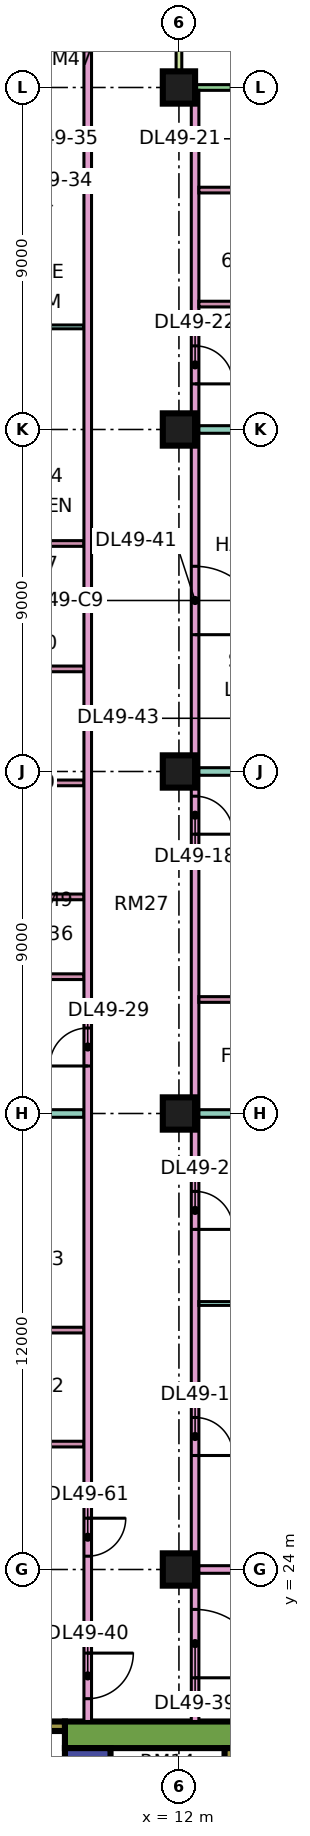
"""IFC4 building model, lengths in metres.
Left out: names, types, materials, properties, quantities, classifications, styles, units other than length and angle.
Written with IfcOpenShell. Run it as: python <this file> out.ifc"""

import sys

from ifc_helpers import new_model, si_unit, direction, frame, frame_2d, origin, origin_2d, place, context, subcontext, project, spatial, rectangle, extrude, element, fill, save


model = new_model("IFC4")
c1 = context("Model", 3, precision=1e-05, world=origin(), true_north=direction((0.0, 1.0)))
c2 = subcontext(c1, "Body", "Model", "MODEL_VIEW")
j1 = project(units=[si_unit("LENGTHUNIT", "METRE"), si_unit("PLANEANGLEUNIT", "RADIAN")], contexts=[c1])
p1 = place(None, origin())
s1 = spatial("IfcSite", under=j1, at=p1, CompositionType="ELEMENT")
p2 = place(p1, origin())
s2 = spatial("IfcBuilding", under=s1, at=p2, CompositionType="ELEMENT")
p3 = place(p2, frame((0.0, 0.0, 211.65)))
s3 = spatial("IfcBuildingStorey", under=s2, at=p3, CompositionType="ELEMENT", Elevation=211.65)
for number, where, z_axis, x_axis in (
    (1, (12.0, 24.0, 0.0), (0.0, 0.0, 1.0), (1.0, 0.0, 0.0)),
    (2, (12.0, 36.0, 0.0), (0.0, 0.0, 1.0), (1.0, 0.0, 0.0)),
    (3, (12.0, 45.0, 0.0), (0.0, 0.0, 1.0), (1.0, 0.0, 0.0)),
    (4, (12.0, 54.0, 0.0), (0.0, 0.0, 1.0), (1.0, 0.0, 0.0)),
    (5, (12.0, 63.0, 0.0), (0.0, 0.0, 1.0), (1.0, 0.0, 0.0)),
):
    element("IfcColumn", number, at=place(p3, frame(where, z_axis=z_axis, x_axis=x_axis)), inside=s3, PredefinedType="COLUMN", context=c2, shape_type="SweptSolid", body=[
        extrude(rectangle(XDim=0.85, YDim=0.85, at=origin_2d()), origin(), (0.0, 0.0, 1.0), 3.75),
    ])
p4 = place(p3, frame((9.0, 19.65, 0.0), z_axis=(0.0, 0.0, 1.0), x_axis=(1.0, 0.0, 0.0)))
e6 = element("IfcWall", 6, at=p4, inside=s3, PredefinedType="SHEAR", context=c2, shape_type="SweptSolid", body=[
    extrude(rectangle(XDim=25.0, YDim=0.7, at=frame_2d((12.5, 0.0))), origin(), (0.0, 0.0, 1.0), 3.75),
])
p5 = place(p4, frame((19.1, 0.0, 0.0)))
e7 = element("IfcOpeningElement", 7, at=p5, cuts=e6, PredefinedType="OPENING", context=c2, shape_type="SweptSolid", body=[
    extrude(rectangle(XDim=1.8, YDim=2.4, at=frame_2d((0.9, 1.2))), frame((0.0, 0.36, 0.0), z_axis=(0.0, -1.0, 0.0), x_axis=(1.0, 0.0, 0.0)), (0.0, 0.0, 1.0), 0.72),
])
p6 = place(p3, frame((9.6, 7.7, 0.0), z_axis=(0.0, 0.0, 1.0), x_axis=(0.0, 1.0, 0.0)))
e8 = element("IfcWall", 8, at=p6, inside=s3, PredefinedType="SHEAR", context=c2, shape_type="SweptSolid", body=[
    extrude(rectangle(XDim=11.6, YDim=1.2, at=frame_2d((5.8, 0.0))), origin(), (0.0, 0.0, 1.0), 3.75),
])
p7 = place(p6, frame((4.175, 0.0, 0.0)))
e9 = element("IfcOpeningElement", 9, at=p7, cuts=e8, PredefinedType="OPENING", context=c2, shape_type="SweptSolid", body=[
    extrude(rectangle(XDim=1.1, YDim=2.2, at=frame_2d((0.55, 1.1))), frame((0.0, 0.61, 0.0), z_axis=(0.0, -1.0, 0.0), x_axis=(1.0, 0.0, 0.0)), (0.0, 0.0, 1.0), 1.22),
])
p8 = place(p6, frame((6.675, 0.0, 0.0)))
e10 = element("IfcOpeningElement", 10, at=p8, cuts=e8, PredefinedType="OPENING", context=c2, shape_type="SweptSolid", body=[
    extrude(rectangle(XDim=1.1, YDim=2.2, at=frame_2d((0.55, 1.1))), frame((0.0, 0.61, 0.0), z_axis=(0.0, -1.0, 0.0), x_axis=(1.0, 0.0, 0.0)), (0.0, 0.0, 1.0), 1.22),
])
p9 = place(p6, frame((9.55, 0.0, 0.0)))
e11 = element("IfcOpeningElement", 11, at=p9, cuts=e8, PredefinedType="OPENING", context=c2, shape_type="SweptSolid", body=[
    extrude(rectangle(XDim=1.1, YDim=2.2, at=frame_2d((0.55, 1.1))), frame((0.0, 0.61, 0.0), z_axis=(0.0, -1.0, 0.0), x_axis=(1.0, 0.0, 0.0)), (0.0, 0.0, 1.0), 1.22),
])
p10 = place(p6, frame((1.85, 0.0, 0.0)))
e12 = element("IfcOpeningElement", 12, at=p10, cuts=e8, PredefinedType="OPENING", context=c2, shape_type="SweptSolid", body=[
    extrude(rectangle(XDim=0.9, YDim=2.1, at=frame_2d((0.45, 1.05))), frame((0.0, 0.61, 0.0), z_axis=(0.0, -1.0, 0.0), x_axis=(1.0, 0.0, 0.0)), (0.0, 0.0, 1.0), 1.22),
])
p11 = place(p3, frame((13.325, 7.7, 0.0), z_axis=(0.0, 0.0, 1.0), x_axis=(0.0, 1.0, 0.0)))
e13 = element("IfcWall", 13, at=p11, inside=s3, PredefinedType="SHEAR", context=c2, shape_type="SweptSolid", body=[
    extrude(rectangle(XDim=11.6, YDim=0.25, at=frame_2d((5.8, 0.0))), origin(), (0.0, 0.0, 1.0), 3.75),
])
p12 = place(p3, frame((2.1, 19.875, 0.0), z_axis=(0.0, 0.0, 1.0), x_axis=(1.0, 0.0, 0.0)))
e14 = element("IfcWall", 14, at=p12, inside=s3, PredefinedType="SHEAR", context=c2, shape_type="SweptSolid", body=[
    extrude(rectangle(XDim=6.9, YDim=0.25, at=frame_2d((3.45, 0.0))), origin(), (0.0, 0.0, 1.0), 3.75),
])
p13 = place(p12, frame((1.175, 0.0, 0.0)))
e15 = element("IfcOpeningElement", 15, at=p13, cuts=e14, PredefinedType="OPENING", context=c2, shape_type="SweptSolid", body=[
    extrude(rectangle(XDim=1.1, YDim=2.2, at=frame_2d((0.55, 1.1))), frame((0.0, 0.135, 0.0), z_axis=(0.0, -1.0, 0.0), x_axis=(1.0, 0.0, 0.0)), (0.0, 0.0, 1.0), 0.27),
])
p14 = place(p12, frame((4.6, 0.0, 0.0)))
e16 = element("IfcOpeningElement", 16, at=p14, cuts=e14, PredefinedType="OPENING", context=c2, shape_type="SweptSolid", body=[
    extrude(rectangle(XDim=1.2, YDim=2.2, at=frame_2d((0.6, 1.1))), frame((0.0, 0.135, 0.0), z_axis=(0.0, -1.0, 0.0), x_axis=(1.0, 0.0, 0.0)), (0.0, 0.0, 1.0), 0.27),
])
p15 = place(p3, frame((22.425, 63.0, 0.0), z_axis=(0.0, 0.0, 1.0), x_axis=(-1.0, 0.0, 0.0)))
e17 = element("IfcWall", 17, at=p15, inside=s3, PredefinedType="SOLIDWALL", context=c2, shape_type="SweptSolid", body=[
    extrude(rectangle(XDim=10.35, YDim=0.15, at=frame_2d((5.175, 0.0))), origin(), (0.0, 0.0, 1.0), 3.35),
])
p16 = place(p15, frame((1.1, 0.0, 0.0)))
e18 = element("IfcOpeningElement", 18, at=p16, cuts=e17, PredefinedType="OPENING", context=c2, shape_type="SweptSolid", body=[
    extrude(rectangle(XDim=1.8, YDim=2.4, at=frame_2d((0.9, 1.2))), frame((0.0, 0.085, 0.0), z_axis=(0.0, -1.0, 0.0), x_axis=(1.0, 0.0, 0.0)), (0.0, 0.0, 1.0), 0.17),
])
p17 = place(p15, frame((6.05, 0.0, 0.45)))
e19 = element("IfcOpeningElement", 19, at=p17, cuts=e17, PredefinedType="OPENING", context=c2, shape_type="SweptSolid", body=[
    extrude(rectangle(XDim=3.0, YDim=2.4, at=frame_2d((1.5, 1.2))), frame((0.0, 0.085, 0.0), z_axis=(0.0, -1.0, 0.0), x_axis=(1.0, 0.0, 0.0)), (0.0, 0.0, 1.0), 0.17),
])
p18 = place(p3, frame((12.0, 64.5, 0.0), z_axis=(0.0, 0.0, 1.0), x_axis=(0.0, -1.0, 0.0)))
e20 = element("IfcWall", 20, at=p18, inside=s3, PredefinedType="SOLIDWALL", context=c2, shape_type="SweptSolid", body=[
    extrude(rectangle(XDim=1.5, YDim=0.15, at=frame_2d((0.75, 0.0))), origin(), (0.0, 0.0, 1.0), 3.35),
])
p19 = place(p3, frame((0.074, 22.4, 0.0), z_axis=(0.0, 0.0, 1.0), x_axis=(1.0, 0.0, 0.0)))
e21 = element("IfcWall", 21, at=p19, inside=s3, PredefinedType="PARTITIONING", context=c2, shape_type="SweptSolid", body=[
    extrude(rectangle(XDim=9.426, YDim=0.2, at=frame_2d((4.713, 0.0))), origin(), (0.0, 0.0, 1.0), 3.35),
])
p20 = place(p3, frame((5.65, 36.0, 0.0), z_axis=(0.0, 0.0, 1.0), x_axis=(1.0, 0.0, 0.0)))
e22 = element("IfcWall", 22, at=p20, inside=s3, PredefinedType="PARTITIONING", context=c2, shape_type="SweptSolid", body=[
    extrude(rectangle(XDim=3.85, YDim=0.2, at=frame_2d((1.925, 0.0))), origin(), (0.0, 0.0, 1.0), 3.35),
])
p21 = place(p3, frame((6.675, 39.6, 0.0), z_axis=(0.0, 0.0, 1.0), x_axis=(1.0, 0.0, 0.0)))
e23 = element("IfcWall", 23, at=p21, inside=s3, PredefinedType="PARTITIONING", context=c2, shape_type="SweptSolid", body=[
    extrude(rectangle(XDim=2.825, YDim=0.15, at=frame_2d((1.413, 0.0))), origin(), (0.0, 0.0, 1.0), 3.35),
])
p22 = place(p21, frame((1.075, 0.0, 0.0)))
e24 = element("IfcOpeningElement", 24, at=p22, cuts=e23, PredefinedType="OPENING", context=c2, shape_type="SweptSolid", body=[
    extrude(rectangle(XDim=0.8, YDim=2.1, at=frame_2d((0.4, 1.05))), frame((0.0, 0.085, 0.0), z_axis=(0.0, -1.0, 0.0), x_axis=(1.0, 0.0, 0.0)), (0.0, 0.0, 1.0), 0.17),
])
for number, where, z_axis, x_axis in (
    (25, (6.675, 41.7, 0.0), (0.0, 0.0, 1.0), (1.0, 0.0, 0.0)),
    (26, (6.675, 44.7, 0.0), (0.0, 0.0, 1.0), (1.0, 0.0, 0.0)),
    (27, (6.675, 47.7, 0.0), (0.0, 0.0, 1.0), (1.0, 0.0, 0.0)),
    (28, (6.675, 51.0, 0.0), (0.0, 0.0, 1.0), (1.0, 0.0, 0.0)),
):
    element("IfcWall", number, at=place(p3, frame(where, z_axis=z_axis, x_axis=x_axis)), inside=s3, PredefinedType="PARTITIONING", context=c2, shape_type="SweptSolid", body=[
        extrude(rectangle(XDim=2.825, YDim=0.15, at=frame_2d((1.413, 0.0))), origin(), (0.0, 0.0, 1.0), 3.35),
    ])
for number, where, z_axis, x_axis in (
    (29, (6.675, 56.7, 0.0), (0.0, 0.0, 1.0), (1.0, 0.0, 0.0)),
    (30, (6.675, 60.3, 0.0), (0.0, 0.0, 1.0), (1.0, 0.0, 0.0)),
):
    element("IfcWall", number, at=place(p3, frame(where, z_axis=z_axis, x_axis=x_axis)), inside=s3, PredefinedType="PARTITIONING", context=c2, shape_type="SweptSolid", body=[
        extrude(rectangle(XDim=2.825, YDim=0.1, at=frame_2d((1.413, 0.0))), origin(), (0.0, 0.0, 1.0), 3.35),
    ])
for number, where, z_axis, x_axis in (
    (31, (6.975, 27.3, 0.0), (0.0, 0.0, 1.0), (1.0, 0.0, 0.0)),
    (32, (6.975, 30.3, 0.0), (0.0, 0.0, 1.0), (1.0, 0.0, 0.0)),
):
    element("IfcWall", number, at=place(p3, frame(where, z_axis=z_axis, x_axis=x_axis)), inside=s3, PredefinedType="PARTITIONING", context=c2, shape_type="SweptSolid", body=[
        extrude(rectangle(XDim=2.525, YDim=0.15, at=frame_2d((1.262, 0.0))), origin(), (0.0, 0.0, 1.0), 3.35),
    ])
p23 = place(p3, frame((9.6, 20.0, 0.0), z_axis=(0.0, 0.0, 1.0), x_axis=(0.0, 1.0, 0.0)))
e33 = element("IfcWall", 33, at=p23, inside=s3, PredefinedType="PARTITIONING", context=c2, shape_type="SweptSolid", body=[
    extrude(rectangle(XDim=44.35, YDim=0.2, at=frame_2d((22.175, 0.0))), origin(), (0.0, 0.0, 1.0), 3.35),
])
p24 = place(p23, frame((17.25, 0.0, 0.0)))
e34 = element("IfcOpeningElement", 34, at=p24, cuts=e33, PredefinedType="OPENING", context=c2, shape_type="SweptSolid", body=[
    extrude(rectangle(XDim=1.0, YDim=2.1, at=frame_2d((0.5, 1.05))), frame((0.0, 0.11, 0.0), z_axis=(0.0, -1.0, 0.0), x_axis=(1.0, 0.0, 0.0)), (0.0, 0.0, 1.0), 0.22),
])
p25 = place(p23, frame((0.6, 0.0, 0.0)))
e35 = element("IfcOpeningElement", 35, at=p25, cuts=e33, PredefinedType="OPENING", context=c2, shape_type="SweptSolid", body=[
    extrude(rectangle(XDim=1.2, YDim=2.1, at=frame_2d((0.6, 1.05))), frame((0.0, 0.11, 0.0), z_axis=(0.0, -1.0, 0.0), x_axis=(1.0, 0.0, 0.0)), (0.0, 0.0, 1.0), 0.22),
])
p26 = place(p23, frame((4.35, 0.0, 0.0)))
e36 = element("IfcOpeningElement", 36, at=p26, cuts=e33, PredefinedType="OPENING", context=c2, shape_type="SweptSolid", body=[
    extrude(rectangle(XDim=1.0, YDim=2.1, at=frame_2d((0.5, 1.05))), frame((0.0, 0.11, 0.0), z_axis=(0.0, -1.0, 0.0), x_axis=(1.0, 0.0, 0.0)), (0.0, 0.0, 1.0), 0.22),
])
p27 = place(p3, frame((12.425, 20.0, 0.0), z_axis=(0.0, 0.0, 1.0), x_axis=(0.0, 1.0, 0.0)))
e37 = element("IfcWall", 37, at=p27, inside=s3, PredefinedType="PARTITIONING", context=c2, shape_type="SweptSolid", body=[
    extrude(rectangle(XDim=42.926, YDim=0.2, at=frame_2d((21.463, 0.0))), origin(), (0.0, 0.0, 1.0), 3.35),
])
p28 = place(p27, frame((7.0, 0.0, 0.0)))
e38 = element("IfcOpeningElement", 38, at=p28, cuts=e37, PredefinedType="OPENING", context=c2, shape_type="SweptSolid", body=[
    extrude(rectangle(XDim=1.0, YDim=2.1, at=frame_2d((0.5, 1.05))), frame((0.0, 0.11, 0.0), z_axis=(0.0, -1.0, 0.0), x_axis=(1.0, 0.0, 0.0)), (0.0, 0.0, 1.0), 0.22),
])
p29 = place(p27, frame((12.95, 0.0, 0.0)))
e39 = element("IfcOpeningElement", 39, at=p29, cuts=e37, PredefinedType="OPENING", context=c2, shape_type="SweptSolid", body=[
    extrude(rectangle(XDim=1.0, YDim=2.1, at=frame_2d((0.5, 1.05))), frame((0.0, 0.11, 0.0), z_axis=(0.0, -1.0, 0.0), x_axis=(1.0, 0.0, 0.0)), (0.0, 0.0, 1.0), 0.22),
])
p30 = place(p27, frame((23.35, 0.0, 0.0)))
e40 = element("IfcOpeningElement", 40, at=p30, cuts=e37, PredefinedType="OPENING", context=c2, shape_type="SweptSolid", body=[
    extrude(rectangle(XDim=1.0, YDim=2.1, at=frame_2d((0.5, 1.05))), frame((0.0, 0.11, 0.0), z_axis=(0.0, -1.0, 0.0), x_axis=(1.0, 0.0, 0.0)), (0.0, 0.0, 1.0), 0.22),
])
p31 = place(p27, frame((35.2, 0.0, 0.0)))
e41 = element("IfcOpeningElement", 41, at=p31, cuts=e37, PredefinedType="OPENING", context=c2, shape_type="SweptSolid", body=[
    extrude(rectangle(XDim=1.0, YDim=2.1, at=frame_2d((0.5, 1.05))), frame((0.0, 0.11, 0.0), z_axis=(0.0, -1.0, 0.0), x_axis=(1.0, 0.0, 0.0)), (0.0, 0.0, 1.0), 0.22),
])
p32 = place(p27, frame((1.15, 0.0, 0.0)))
e42 = element("IfcOpeningElement", 42, at=p32, cuts=e37, PredefinedType="OPENING", context=c2, shape_type="SweptSolid", body=[
    extrude(rectangle(XDim=1.8, YDim=2.1, at=frame_2d((0.9, 1.05))), frame((0.0, 0.11, 0.0), z_axis=(0.0, -1.0, 0.0), x_axis=(1.0, 0.0, 0.0)), (0.0, 0.0, 1.0), 0.22),
])
p33 = place(p27, frame((28.6, 0.0, 0.0)))
e43 = element("IfcOpeningElement", 43, at=p33, cuts=e37, PredefinedType="OPENING", context=c2, shape_type="SweptSolid", body=[
    extrude(rectangle(XDim=1.8, YDim=2.1, at=frame_2d((0.9, 1.05))), frame((0.0, 0.11, 0.0), z_axis=(0.0, -1.0, 0.0), x_axis=(1.0, 0.0, 0.0)), (0.0, 0.0, 1.0), 0.22),
])
p34 = place(p3, frame((12.525, 24.0, 0.0), z_axis=(0.0, 0.0, 1.0), x_axis=(1.0, 0.0, 0.0)))
e44 = element("IfcWall", 44, at=p34, inside=s3, PredefinedType="PARTITIONING", context=c2, shape_type="SweptSolid", body=[
    extrude(rectangle(XDim=8.975, YDim=0.2, at=frame_2d((4.488, 0.0))), origin(), (0.0, 0.0, 1.0), 3.35),
])
p35 = place(p3, frame((12.525, 31.0, 0.0), z_axis=(0.0, 0.0, 1.0), x_axis=(1.0, 0.0, 0.0)))
e45 = element("IfcWall", 45, at=p35, inside=s3, PredefinedType="PARTITIONING", context=c2, shape_type="SweptSolid", body=[
    extrude(rectangle(XDim=8.975, YDim=0.1, at=frame_2d((4.488, 0.0))), origin(), (0.0, 0.0, 1.0), 3.35),
])
p36 = place(p3, frame((12.525, 36.0, 0.0), z_axis=(0.0, 0.0, 1.0), x_axis=(1.0, 0.0, 0.0)))
e46 = element("IfcWall", 46, at=p36, inside=s3, PredefinedType="PARTITIONING", context=c2, shape_type="SweptSolid", body=[
    extrude(rectangle(XDim=11.475, YDim=0.2, at=frame_2d((5.738, 0.0))), origin(), (0.0, 0.0, 1.0), 3.35),
])
for number, where, z_axis, x_axis in (
    (47, (12.525, 39.0, 0.0), (0.0, 0.0, 1.0), (1.0, 0.0, 0.0)),
    (48, (12.525, 42.6, 0.0), (0.0, 0.0, 1.0), (1.0, 0.0, 0.0)),
):
    element("IfcWall", number, at=place(p3, frame(where, z_axis=z_axis, x_axis=x_axis)), inside=s3, PredefinedType="PARTITIONING", context=c2, shape_type="SweptSolid", body=[
        extrude(rectangle(XDim=5.225, YDim=0.15, at=frame_2d((2.613, 0.0))), origin(), (0.0, 0.0, 1.0), 3.35),
    ])
p37 = place(p3, frame((12.525, 45.0, 0.0), z_axis=(0.0, 0.0, 1.0), x_axis=(1.0, 0.0, 0.0)))
e49 = element("IfcWall", 49, at=p37, inside=s3, PredefinedType="PARTITIONING", context=c2, shape_type="SweptSolid", body=[
    extrude(rectangle(XDim=11.401, YDim=0.2, at=frame_2d((5.701, 0.0))), origin(), (0.0, 0.0, 1.0), 3.35),
])
p38 = place(p3, frame((12.525, 54.0, 0.0), z_axis=(0.0, 0.0, 1.0), x_axis=(1.0, 0.0, 0.0)))
e50 = element("IfcWall", 50, at=p38, inside=s3, PredefinedType="PARTITIONING", context=c2, shape_type="SweptSolid", body=[
    extrude(rectangle(XDim=11.475, YDim=0.2, at=frame_2d((5.738, 0.0))), origin(), (0.0, 0.0, 1.0), 3.35),
])
for number, where, z_axis, x_axis in (
    (51, (12.525, 57.3, 0.0), (0.0, 0.0, 1.0), (1.0, 0.0, 0.0)),
    (52, (12.525, 60.3, 0.0), (0.0, 0.0, 1.0), (1.0, 0.0, 0.0)),
):
    element("IfcWall", number, at=place(p3, frame(where, z_axis=z_axis, x_axis=x_axis)), inside=s3, PredefinedType="PARTITIONING", context=c2, shape_type="SweptSolid", body=[
        extrude(rectangle(XDim=4.625, YDim=0.15, at=frame_2d((2.312, 0.0))), origin(), (0.0, 0.0, 1.0), 3.35),
    ])
p39 = place(p28, frame((1.0, 0.0, 0.0), z_axis=(0.0, 0.0, 1.0), x_axis=(-1.0, 0.0, 0.0)))
e53 = element("IfcDoor", 53, at=p39, inside=s3, OperationType="SINGLE_SWING_LEFT", PredefinedType="DOOR", context=c2, shape_type="SweptSolid", body=[
    extrude(rectangle(XDim=1.0, YDim=2.1, at=frame_2d((0.5, 1.05))), frame((0.0, 0.025, 0.0), z_axis=(0.0, -1.0, 0.0), x_axis=(1.0, 0.0, 0.0)), (0.0, 0.0, 1.0), 0.05),
])
fill(e38, e53)
p40 = place(p29, frame((1.0, 0.0, 0.0), z_axis=(0.0, 0.0, 1.0), x_axis=(-1.0, 0.0, 0.0)))
e54 = element("IfcDoor", 54, at=p40, inside=s3, OperationType="SINGLE_SWING_LEFT", PredefinedType="DOOR", context=c2, shape_type="SweptSolid", body=[
    extrude(rectangle(XDim=1.0, YDim=2.1, at=frame_2d((0.5, 1.05))), frame((0.0, 0.025, 0.0), z_axis=(0.0, -1.0, 0.0), x_axis=(1.0, 0.0, 0.0)), (0.0, 0.0, 1.0), 0.05),
])
fill(e39, e54)
p41 = place(p30, frame((1.0, 0.0, 0.0), z_axis=(0.0, 0.0, 1.0), x_axis=(-1.0, 0.0, 0.0)))
e55 = element("IfcDoor", 55, at=p41, inside=s3, OperationType="SINGLE_SWING_LEFT", PredefinedType="DOOR", context=c2, shape_type="SweptSolid", body=[
    extrude(rectangle(XDim=1.0, YDim=2.1, at=frame_2d((0.5, 1.05))), frame((0.0, 0.025, 0.0), z_axis=(0.0, -1.0, 0.0), x_axis=(1.0, 0.0, 0.0)), (0.0, 0.0, 1.0), 0.05),
])
fill(e40, e55)
p42 = place(p31, frame((1.0, 0.0, 0.0), z_axis=(0.0, 0.0, 1.0), x_axis=(-1.0, 0.0, 0.0)))
e56 = element("IfcDoor", 56, at=p42, inside=s3, OperationType="SINGLE_SWING_LEFT", PredefinedType="DOOR", context=c2, shape_type="SweptSolid", body=[
    extrude(rectangle(XDim=1.0, YDim=2.1, at=frame_2d((0.5, 1.05))), frame((0.0, 0.025, 0.0), z_axis=(0.0, -1.0, 0.0), x_axis=(1.0, 0.0, 0.0)), (0.0, 0.0, 1.0), 0.05),
])
fill(e41, e56)
p43 = place(p24, origin())
e57 = element("IfcDoor", 57, at=p43, inside=s3, OperationType="SINGLE_SWING_LEFT", PredefinedType="DOOR", context=c2, shape_type="SweptSolid", body=[
    extrude(rectangle(XDim=1.0, YDim=2.1, at=frame_2d((0.5, 1.05))), frame((0.0, 0.025, 0.0), z_axis=(0.0, -1.0, 0.0), x_axis=(1.0, 0.0, 0.0)), (0.0, 0.0, 1.0), 0.05),
])
fill(e34, e57)
p44 = place(p32, frame((1.8, 0.0, 0.0), z_axis=(0.0, 0.0, 1.0), x_axis=(-1.0, 0.0, 0.0)))
e58 = element("IfcDoor", 58, at=p44, inside=s3, OperationType="DOUBLE_DOOR_SINGLE_SWING", PredefinedType="DOOR", context=c2, shape_type="SweptSolid", body=[
    extrude(rectangle(XDim=1.8, YDim=2.1, at=frame_2d((0.9, 1.05))), frame((0.0, 0.025, 0.0), z_axis=(0.0, -1.0, 0.0), x_axis=(1.0, 0.0, 0.0)), (0.0, 0.0, 1.0), 0.05),
])
fill(e42, e58)
p45 = place(p25, origin())
e59 = element("IfcDoor", 59, at=p45, inside=s3, OperationType="SINGLE_SWING_RIGHT", PredefinedType="DOOR", context=c2, shape_type="SweptSolid", body=[
    extrude(rectangle(XDim=1.2, YDim=2.1, at=frame_2d((0.6, 1.05))), frame((0.0, 0.025, 0.0), z_axis=(0.0, -1.0, 0.0), x_axis=(1.0, 0.0, 0.0)), (0.0, 0.0, 1.0), 0.05),
])
fill(e35, e59)
p46 = place(p33, frame((1.8, 0.0, 0.0), z_axis=(0.0, 0.0, 1.0), x_axis=(-1.0, 0.0, 0.0)))
e60 = element("IfcDoor", 60, at=p46, inside=s3, OperationType="DOUBLE_DOOR_SINGLE_SWING", PredefinedType="DOOR", context=c2, shape_type="SweptSolid", body=[
    extrude(rectangle(XDim=1.8, YDim=2.1, at=frame_2d((0.9, 1.05))), frame((0.0, 0.025, 0.0), z_axis=(0.0, -1.0, 0.0), x_axis=(1.0, 0.0, 0.0)), (0.0, 0.0, 1.0), 0.05),
])
fill(e43, e60)
p47 = place(p26, origin())
e61 = element("IfcDoor", 61, at=p47, inside=s3, OperationType="SINGLE_SWING_RIGHT", PredefinedType="DOOR", context=c2, shape_type="SweptSolid", body=[
    extrude(rectangle(XDim=1.0, YDim=2.1, at=frame_2d((0.5, 1.05))), frame((0.0, 0.025, 0.0), z_axis=(0.0, -1.0, 0.0), x_axis=(1.0, 0.0, 0.0)), (0.0, 0.0, 1.0), 0.05),
])
fill(e36, e61)
save(model, sys.argv[1])
